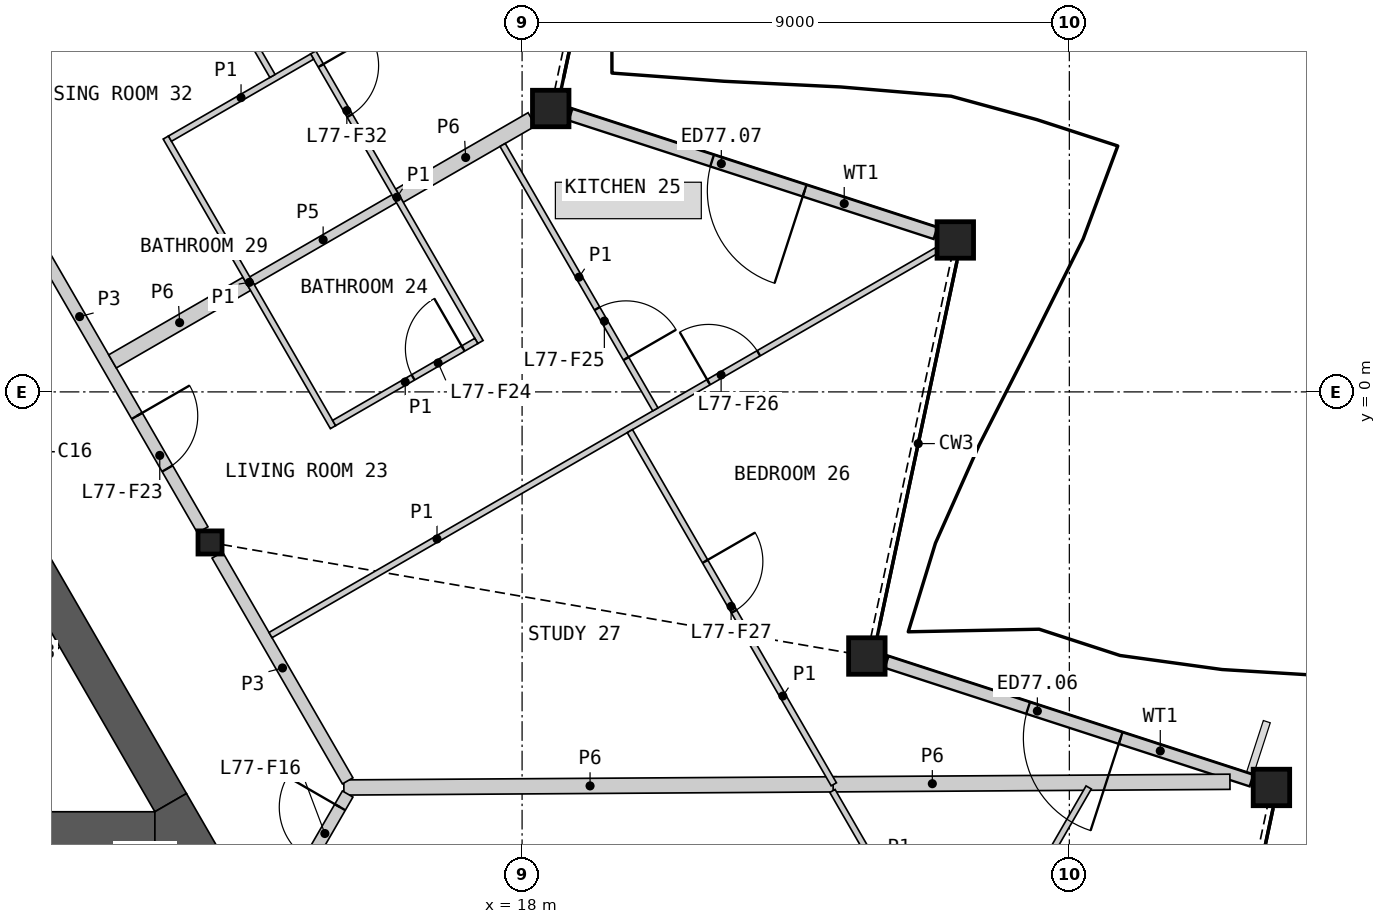
"""IFC4 building model, lengths in metres.
Left out: names, types, materials, properties, quantities, classifications, styles, units other than length and angle.
Written with IfcOpenShell. Run it as: python <this file> out.ifc"""

import sys

from ifc_helpers import new_model, si_unit, direction, frame, frame_2d, origin, origin_2d, place, context, subcontext, project, spatial, polyline, rectangle, hollow_rectangle, i_section, outline, extrude, element, fill, save


model = new_model("IFC4")
c1 = context("Model", 3, precision=1e-05, world=origin(), true_north=direction((0.0, 1.0)))
c2 = subcontext(c1, "Body", "Model", "MODEL_VIEW")
j1 = project(units=[si_unit("LENGTHUNIT", "METRE"), si_unit("PLANEANGLEUNIT", "RADIAN")], contexts=[c1])
p1 = place(None, origin())
s1 = spatial("IfcSite", under=j1, at=p1, CompositionType="ELEMENT")
p2 = place(p1, origin())
s2 = spatial("IfcBuilding", under=s1, at=p2, CompositionType="ELEMENT")
p3 = place(p2, frame((0.0, 0.0, 342.6)))
s3 = spatial("IfcBuildingStorey", under=s2, at=p3, CompositionType="ELEMENT", Elevation=342.6)
for number, where, z_axis, x_axis in (
    (1, (30.324, -6.506, 0.0), (0.0, 0.0, 1.0), (1.0, 0.0, 0.0)),
    (2, (23.67, -4.344, 0.0), (0.0, 0.0, 1.0), (1.0, 0.0, 0.0)),
    (3, (25.125, 2.499, 0.0), (0.0, 0.0, 1.0), (1.0, 0.0, 0.0)),
    (4, (18.471, 4.661, 0.0), (0.0, 0.0, 1.0), (1.0, 0.0, 0.0)),
):
    element("IfcColumn", number, at=place(p3, frame(where, z_axis=z_axis, x_axis=x_axis)), inside=s3, PredefinedType="COLUMN", context=c2, shape_type="SweptSolid", body=[
        extrude(hollow_rectangle(XDim=0.6, YDim=0.6, WallThickness=0.04, at=origin_2d()), origin(), (0.0, 0.0, 1.0), 3.4),
    ])
p4 = place(p3, frame((12.868, -2.476, 0.0), z_axis=(0.0, 0.0, 1.0), x_axis=(1.0, 0.0, 0.0)))
e5 = element("IfcColumn", 5, at=p4, inside=s3, PredefinedType="COLUMN", context=c2, shape_type="SweptSolid", body=[
    extrude(i_section(OverallWidth=0.396, OverallDepth=0.381, WebThickness=0.019, FlangeThickness=0.03, at=origin_2d()), origin(), (0.0, 0.0, 1.0), 3.4),
])
p5 = place(p3, frame((29.996, -6.393, 0.0), z_axis=(0.0, 0.0, 1.0), x_axis=(-0.951051127664, 0.309033578383, 0.0)))
e6 = element("IfcWall", 6, at=p5, inside=s3, PredefinedType="SOLIDWALL", context=c2, shape_type="SweptSolid", body=[
    extrude(rectangle(XDim=6.31, YDim=0.2, at=frame_2d((3.155, 0.0))), origin(), (0.0, 0.0, 1.0), 2.488),
])
p6 = place(p5, frame((2.263, 0.0, 0.0)))
e7 = element("IfcOpeningElement", 7, at=p6, cuts=e6, PredefinedType="OPENING", context=c2, shape_type="SweptSolid", body=[
    extrude(rectangle(XDim=1.6, YDim=2.25, at=frame_2d((0.8, 1.125))), frame((0.0, 0.11, 0.0), z_axis=(0.0, -1.0, 0.0), x_axis=(1.0, 0.0, 0.0)), (0.0, 0.0, 1.0), 0.22),
])
p7 = place(p3, frame((24.798, 2.609, 0.0), z_axis=(0.0, 0.0, 1.0), x_axis=(-0.951065616977, 0.308988983952, 0.0)))
e8 = element("IfcWall", 8, at=p7, inside=s3, PredefinedType="SOLIDWALL", context=c2, shape_type="SweptSolid", body=[
    extrude(rectangle(XDim=6.312, YDim=0.2, at=frame_2d((3.156, 0.0))), origin(), (0.0, 0.0, 1.0), 2.488),
])
p8 = place(p7, frame((2.263, 0.0, 0.0)))
e9 = element("IfcOpeningElement", 9, at=p8, cuts=e8, PredefinedType="OPENING", context=c2, shape_type="SweptSolid", body=[
    extrude(rectangle(XDim=1.6, YDim=2.25, at=frame_2d((0.8, 1.125))), frame((0.0, 0.11, 0.0), z_axis=(0.0, -1.0, 0.0), x_axis=(1.0, 0.0, 0.0)), (0.0, 0.0, 1.0), 0.22),
])
p9 = place(p3, origin())
e10 = element("IfcWall", 10, at=p9, inside=s3, PredefinedType="SHEAR", context=c2, shape_type="SweptSolid", body=[
    extrude(outline(polyline([(8.83, -6.881), (10.374, -4.206), (10.032, -4.298), (8.738, -6.539), (8.83, -6.881)])), origin(), (0.0, 0.0, 1.0), 3.1),
])
p10 = place(p3, origin())
e11 = element("IfcWall", 11, at=p10, inside=s3, PredefinedType="SHEAR", context=c2, shape_type="SweptSolid", body=[
    extrude(outline(polyline([(10.032, -4.298), (10.374, -4.206), (5.307, -1.281), (5.182, -1.498), (10.032, -4.298)])), origin(), (0.0, 0.0, 1.0), 3.1),
])
p11 = place(p3, frame((-11.961, -7.206, 0.0), z_axis=(0.0, 0.0, 1.0), x_axis=(1.0, 0.0, 0.0)))
e12 = element("IfcWall", 12, at=p11, inside=s3, PredefinedType="SHEAR", context=c2, shape_type="SweptSolid", body=[
    extrude(rectangle(XDim=23.921, YDim=0.6, at=frame_2d((11.961, 0.0))), origin(), (0.0, 0.0, 1.0), 3.1),
])
p12 = place(p3, frame((12.221, -6.756, 0.0), z_axis=(0.0, 0.0, 1.0), x_axis=(-0.50000604952, 0.866021911064, 0.0)))
e13 = element("IfcWall", 13, at=p12, inside=s3, PredefinedType="SHEAR", context=c2, shape_type="SweptSolid", body=[
    extrude(rectangle(XDim=4.869, YDim=0.6, at=frame_2d((2.434, 0.0))), origin(), (0.0, 0.0, 1.0), 3.1),
])
p13 = place(p3, origin())
e14 = element("IfcWall", 14, at=p13, inside=s3, PredefinedType="SHEAR", context=c2, shape_type="SweptSolid", body=[
    extrude(outline(polyline([(11.961, -7.506), (11.961, -6.906), (12.48, -6.606), (13.0, -7.506), (11.961, -7.506)])), origin(), (0.0, 0.0, 1.0), 3.1),
])
p14 = place(p3, frame((8.698, 4.745, 0.0), z_axis=(0.0, 0.0, 1.0), x_axis=(0.499984266882, -0.866034487114, 0.0)))
e15 = element("IfcWall", 15, at=p14, inside=s3, PredefinedType="PARTITIONING", context=c2, shape_type="SweptSolid", body=[
    extrude(rectangle(XDim=8.099, YDim=0.2, at=frame_2d((4.049, 0.0))), origin(), (0.0, 0.0, 1.0), 3.1),
])
p15 = place(p14, frame((5.935, 0.0, 0.0)))
e16 = element("IfcOpeningElement", 16, at=p15, cuts=e15, PredefinedType="OPENING", context=c2, shape_type="SweptSolid", body=[
    extrude(rectangle(XDim=1.0, YDim=2.1, at=frame_2d((0.5, 1.05))), frame((0.0, 0.11, 0.0), z_axis=(0.0, -1.0, 0.0), x_axis=(1.0, 0.0, 0.0)), (0.0, 0.0, 1.0), 0.22),
])
p16 = place(p3, frame((15.069, -6.506, 0.0), z_axis=(0.0, 0.0, 1.0), x_axis=(0.999979186485, 0.006451867641, 0.0)))
e17 = element("IfcWall", 17, at=p16, inside=s3, PredefinedType="PARTITIONING", context=c2, shape_type="SweptSolid", body=[
    extrude(rectangle(XDim=8.098, YDim=0.25, at=frame_2d((4.049, 0.0))), origin(), (0.0, 0.0, 1.0), 2.33),
])
p17 = place(p3, frame((23.115, -6.455, 0.0), z_axis=(0.0, 0.0, 1.0), x_axis=(0.999979299397, 0.006434343627, 0.0)))
e18 = element("IfcWall", 18, at=p17, inside=s3, PredefinedType="PARTITIONING", context=c2, shape_type="SweptSolid", body=[
    extrude(rectangle(XDim=6.526, YDim=0.25, at=frame_2d((3.263, 0.0))), origin(), (0.0, 0.0, 1.0), 2.33),
])
p18 = place(p3, frame((12.988, -2.684, 0.0), z_axis=(0.0, 0.0, 1.0), x_axis=(0.500003406062, -0.866023437285, 0.0)))
e19 = element("IfcWall", 19, at=p18, inside=s3, PredefinedType="PARTITIONING", context=c2, shape_type="SweptSolid", body=[
    extrude(rectangle(XDim=4.288, YDim=0.2, at=frame_2d((2.144, 0.0))), origin(), (0.0, 0.0, 1.0), 3.1),
])
p19 = place(p3, frame((13.293, -9.797, 0.0), z_axis=(0.0, 0.0, 1.0), x_axis=(0.499967746641, 0.866044024469, 0.0)))
e20 = element("IfcWall", 20, at=p19, inside=s3, PredefinedType="PARTITIONING", context=c2, shape_type="SweptSolid", body=[
    extrude(rectangle(XDim=3.676, YDim=0.2, at=frame_2d((1.838, 0.0))), origin(), (0.0, 0.0, 1.0), 3.1),
])
p20 = place(p19, frame((2.426, 0.0, 0.0)))
e21 = element("IfcOpeningElement", 21, at=p20, cuts=e20, PredefinedType="OPENING", context=c2, shape_type="SweptSolid", body=[
    extrude(rectangle(XDim=1.0, YDim=2.1, at=frame_2d((0.5, 1.05))), frame((0.0, 0.11, 0.0), z_axis=(0.0, -1.0, 0.0), x_axis=(1.0, 0.0, 0.0)), (0.0, 0.0, 1.0), 0.22),
])
p21 = place(p3, frame((11.264, 0.502, 0.0), z_axis=(0.0, 0.0, 1.0), x_axis=(0.866030925526, 0.499990435942, 0.0)))
e22 = element("IfcWall", 22, at=p21, inside=s3, PredefinedType="PARTITIONING", context=c2, shape_type="SweptSolid", body=[
    extrude(rectangle(XDim=2.55, YDim=0.25, at=frame_2d((1.275, 0.0))), origin(), (0.0, 0.0, 1.0), 2.33),
])
p22 = place(p3, frame((15.984, 3.227, 0.0), z_axis=(0.0, 0.0, 1.0), x_axis=(0.8660174017, 0.500013859761, 0.0)))
e23 = element("IfcWall", 23, at=p22, inside=s3, PredefinedType="PARTITIONING", context=c2, shape_type="SweptSolid", body=[
    extrude(rectangle(XDim=2.514, YDim=0.25, at=frame_2d((1.257, 0.0))), origin(), (0.0, 0.0, 1.0), 2.33),
])
p23 = place(p3, frame((13.559, 1.827, 0.0), z_axis=(0.0, 0.0, 1.0), x_axis=(0.866059108428, 0.4999416173, 0.0)))
e24 = element("IfcWall", 24, at=p23, inside=s3, PredefinedType="PLUMBINGWALL", context=c2, shape_type="SweptSolid", body=[
    extrude(rectangle(XDim=2.7, YDim=0.15, at=frame_2d((1.35, 0.0))), origin(), (0.0, 0.0, 1.0), 2.33),
])
p24 = place(p3, frame((13.863, -4.0, 0.0), z_axis=(0.0, 0.0, 1.0), x_axis=(0.866033203648, 0.499986489997, 0.0)))
e25 = element("IfcWall", 25, at=p24, inside=s3, PredefinedType="PARTITIONING", context=c2, shape_type="SweptSolid", body=[
    extrude(rectangle(XDim=12.646, YDim=0.1, at=frame_2d((6.323, 0.0))), origin(), (0.0, 0.0, 1.0), 2.33),
])
p25 = place(p24, frame((8.319, 0.0, 0.0)))
e26 = element("IfcOpeningElement", 26, at=p25, cuts=e25, PredefinedType="OPENING", context=c2, shape_type="SweptSolid", body=[
    extrude(rectangle(XDim=0.95, YDim=2.1, at=frame_2d((0.475, 1.05))), frame((0.0, 0.06, 0.0), z_axis=(0.0, -1.0, 0.0), x_axis=(1.0, 0.0, 0.0)), (0.0, 0.0, 1.0), 0.12),
])
p26 = place(p3, frame((8.786, 5.073, 0.0), z_axis=(0.0, 0.0, 1.0), x_axis=(0.86602139559, 0.500006942333, 0.0)))
e27 = element("IfcWall", 27, at=p26, inside=s3, PredefinedType="PARTITIONING", context=c2, shape_type="SweptSolid", body=[
    extrude(rectangle(XDim=12.505, YDim=0.1, at=frame_2d((6.252, 0.0))), origin(), (0.0, 0.0, 1.0), 2.33),
])
p27 = place(p26, frame((4.772, 0.0, 0.0)))
e28 = element("IfcOpeningElement", 28, at=p27, cuts=e27, PredefinedType="OPENING", context=c2, shape_type="SweptSolid", body=[
    extrude(rectangle(XDim=0.95, YDim=2.1, at=frame_2d((0.475, 1.05))), frame((0.0, 0.06, 0.0), z_axis=(0.0, -1.0, 0.0), x_axis=(1.0, 0.0, 0.0)), (0.0, 0.0, 1.0), 0.12),
])
p28 = place(p3, frame((23.331, -13.412, 0.0), z_axis=(0.0, 0.0, 1.0), x_axis=(0.499994510044, 0.866028573389, 0.0)))
e29 = element("IfcWall", 29, at=p28, inside=s3, PredefinedType="PARTITIONING", context=c2, shape_type="SweptSolid", body=[
    extrude(rectangle(XDim=7.975, YDim=0.1, at=frame_2d((3.988, 0.0))), origin(), (0.0, 0.0, 1.0), 2.33),
])
p29 = place(p28, frame((1.957, 0.0, 0.0)))
e30 = element("IfcOpeningElement", 30, at=p29, cuts=e29, PredefinedType="OPENING", context=c2, shape_type="SweptSolid", body=[
    extrude(rectangle(XDim=0.95, YDim=2.1, at=frame_2d((0.475, 1.05))), frame((0.0, 0.06, 0.0), z_axis=(0.0, -1.0, 0.0), x_axis=(1.0, 0.0, 0.0)), (0.0, 0.0, 1.0), 0.12),
])
p30 = place(p3, frame((19.773, -0.645, 0.0), z_axis=(0.0, 0.0, 1.0), x_axis=(0.499998644583, -0.866026186333, 0.0)))
e31 = element("IfcWall", 31, at=p30, inside=s3, PredefinedType="PARTITIONING", context=c2, shape_type="SweptSolid", body=[
    extrude(rectangle(XDim=6.708, YDim=0.1, at=frame_2d((3.354, 0.0))), origin(), (0.0, 0.0, 1.0), 2.33),
])
p31 = place(p30, frame((2.475, 0.0, 0.0)))
e32 = element("IfcOpeningElement", 32, at=p31, cuts=e31, PredefinedType="OPENING", context=c2, shape_type="SweptSolid", body=[
    extrude(rectangle(XDim=0.95, YDim=2.1, at=frame_2d((0.475, 1.05))), frame((0.0, 0.06, 0.0), z_axis=(0.0, -1.0, 0.0), x_axis=(1.0, 0.0, 0.0)), (0.0, 0.0, 1.0), 0.12),
])
p32 = place(p3, frame((14.565, 5.583, 0.0), z_axis=(0.0, 0.0, 1.0), x_axis=(0.499996545922, -0.866027397988, 0.0)))
e33 = element("IfcWall", 33, at=p32, inside=s3, PredefinedType="PARTITIONING", context=c2, shape_type="SweptSolid", body=[
    extrude(rectangle(XDim=5.5, YDim=0.1, at=frame_2d((2.75, 0.0))), origin(), (0.0, 0.0, 1.0), 2.33),
])
p33 = place(p32, frame((0.25, 0.0, 0.0)))
e34 = element("IfcOpeningElement", 34, at=p33, cuts=e33, PredefinedType="OPENING", context=c2, shape_type="SweptSolid", body=[
    extrude(rectangle(XDim=0.95, YDim=2.1, at=frame_2d((0.475, 1.05))), frame((0.0, 0.06, 0.0), z_axis=(0.0, -1.0, 0.0), x_axis=(1.0, 0.0, 0.0)), (0.0, 0.0, 1.0), 0.12),
])
p34 = place(p3, frame((12.14, 4.183, 0.0), z_axis=(0.0, 0.0, 1.0), x_axis=(0.499996545922, -0.866027397988, 0.0)))
e35 = element("IfcWall", 35, at=p34, inside=s3, PredefinedType="PARTITIONING", context=c2, shape_type="SweptSolid", body=[
    extrude(rectangle(XDim=5.5, YDim=0.1, at=frame_2d((2.75, 0.0))), origin(), (0.0, 0.0, 1.0), 2.33),
])
p35 = place(p3, frame((17.68, 4.062, 0.0), z_axis=(0.0, 0.0, 1.0), x_axis=(0.499997360652, -0.866026927608, 0.0)))
e36 = element("IfcWall", 36, at=p35, inside=s3, PredefinedType="PARTITIONING", context=c2, shape_type="SweptSolid", body=[
    extrude(rectangle(XDim=5.022, YDim=0.1, at=frame_2d((2.511, 0.0))), origin(), (0.0, 0.0, 1.0), 2.33),
])
p36 = place(p35, frame((3.108, 0.0, 0.0)))
e37 = element("IfcOpeningElement", 37, at=p36, cuts=e36, PredefinedType="OPENING", context=c2, shape_type="SweptSolid", body=[
    extrude(rectangle(XDim=0.95, YDim=2.1, at=frame_2d((0.475, 1.05))), frame((0.0, 0.06, 0.0), z_axis=(0.0, -1.0, 0.0), x_axis=(1.0, 0.0, 0.0)), (0.0, 0.0, 1.0), 0.12),
])
p37 = place(p3, frame((23.104, -6.563, 0.0), z_axis=(0.0, 0.0, 1.0), x_axis=(0.499999078476, -0.866025935826, 0.0)))
e38 = element("IfcWall", 38, at=p37, inside=s3, PredefinedType="PARTITIONING", context=c2, shape_type="SweptSolid", body=[
    extrude(rectangle(XDim=2.979, YDim=0.1, at=frame_2d((1.49, 0.0))), origin(), (0.0, 0.0, 1.0), 2.33),
])
p38 = place(p3, frame((14.909, -0.512, 0.0), z_axis=(0.0, 0.0, 1.0), x_axis=(0.866019956843, 0.50000943426, 0.0)))
e39 = element("IfcWall", 39, at=p38, inside=s3, PredefinedType="PARTITIONING", context=c2, shape_type="SweptSolid", body=[
    extrude(rectangle(XDim=2.7, YDim=0.1, at=frame_2d((1.35, 0.0))), origin(), (0.0, 0.0, 1.0), 2.33),
])
p39 = place(p38, frame((1.5, 0.0, 0.0)))
e40 = element("IfcOpeningElement", 40, at=p39, cuts=e39, PredefinedType="OPENING", context=c2, shape_type="SweptSolid", body=[
    extrude(rectangle(XDim=0.95, YDim=2.1, at=frame_2d((0.475, 1.05))), frame((0.0, 0.06, 0.0), z_axis=(0.0, -1.0, 0.0), x_axis=(1.0, 0.0, 0.0)), (0.0, 0.0, 1.0), 0.12),
])
p40 = place(p3, frame((12.209, 4.165, 0.0), z_axis=(0.0, 0.0, 1.0), x_axis=(0.866019956843, 0.50000943426, 0.0)))
e41 = element("IfcWall", 41, at=p40, inside=s3, PredefinedType="PARTITIONING", context=c2, shape_type="SweptSolid", body=[
    extrude(rectangle(XDim=2.7, YDim=0.1, at=frame_2d((1.35, 0.0))), origin(), (0.0, 0.0, 1.0), 2.33),
])
p41 = place(p3, frame((12.696, 7.272, 0.0), z_axis=(0.0, 0.0, 1.0), x_axis=(0.500016292001, -0.866015997389, 0.0)))
e42 = element("IfcWall", 42, at=p41, inside=s3, PredefinedType="PARTITIONING", context=c2, shape_type="SweptSolid", body=[
    extrude(rectangle(XDim=2.397, YDim=0.1, at=frame_2d((1.199, 0.0))), origin(), (0.0, 0.0, 1.0), 2.33),
])
p42 = place(p41, frame((0.882, 0.0, 0.0)))
e43 = element("IfcOpeningElement", 43, at=p42, cuts=e42, PredefinedType="OPENING", context=c2, shape_type="SweptSolid", body=[
    extrude(rectangle(XDim=0.95, YDim=2.1, at=frame_2d((0.475, 1.05))), frame((0.0, 0.06, 0.0), z_axis=(0.0, -1.0, 0.0), x_axis=(1.0, 0.0, 0.0)), (0.0, 0.0, 1.0), 0.12),
])
p43 = place(p6, origin())
e44 = element("IfcDoor", 44, at=p43, inside=s3, OperationType="DOUBLE_DOOR_SINGLE_SWING", PredefinedType="DOOR", context=c2, shape_type="SweptSolid", body=[
    extrude(rectangle(XDim=1.6, YDim=2.25, at=frame_2d((0.8, 1.125))), frame((0.0, 0.025, 0.0), z_axis=(0.0, -1.0, 0.0), x_axis=(1.0, 0.0, 0.0)), (0.0, 0.0, 1.0), 0.05),
])
fill(e7, e44)
p44 = place(p8, origin())
e45 = element("IfcDoor", 45, at=p44, inside=s3, OperationType="DOUBLE_DOOR_SINGLE_SWING", PredefinedType="DOOR", context=c2, shape_type="SweptSolid", body=[
    extrude(rectangle(XDim=1.6, YDim=2.25, at=frame_2d((0.8, 1.125))), frame((0.0, 0.025, 0.0), z_axis=(0.0, -1.0, 0.0), x_axis=(1.0, 0.0, 0.0)), (0.0, 0.0, 1.0), 0.05),
])
fill(e9, e45)
p45 = place(p20, origin())
e46 = element("IfcDoor", 46, at=p45, inside=s3, OperationType="SINGLE_SWING_RIGHT", PredefinedType="DOOR", context=c2, shape_type="SweptSolid", body=[
    extrude(rectangle(XDim=1.0, YDim=2.1, at=frame_2d((0.5, 1.05))), frame((0.0, 0.025, 0.0), z_axis=(0.0, -1.0, 0.0), x_axis=(1.0, 0.0, 0.0)), (0.0, 0.0, 1.0), 0.05),
])
fill(e21, e46)
p46 = place(p15, origin())
e47 = element("IfcDoor", 47, at=p46, inside=s3, OperationType="SINGLE_SWING_LEFT", PredefinedType="DOOR", context=c2, shape_type="SweptSolid", body=[
    extrude(rectangle(XDim=1.0, YDim=2.1, at=frame_2d((0.5, 1.05))), frame((0.0, 0.025, 0.0), z_axis=(0.0, -1.0, 0.0), x_axis=(1.0, 0.0, 0.0)), (0.0, 0.0, 1.0), 0.05),
])
fill(e16, e47)
p47 = place(p39, origin())
e48 = element("IfcDoor", 48, at=p47, inside=s3, OperationType="SINGLE_SWING_RIGHT", PredefinedType="DOOR", context=c2, shape_type="SweptSolid", body=[
    extrude(rectangle(XDim=0.95, YDim=2.1, at=frame_2d((0.475, 1.05))), frame((0.0, 0.025, 0.0), z_axis=(0.0, -1.0, 0.0), x_axis=(1.0, 0.0, 0.0)), (0.0, 0.0, 1.0), 0.05),
])
fill(e40, e48)
p48 = place(p36, origin())
e49 = element("IfcDoor", 49, at=p48, inside=s3, OperationType="SINGLE_SWING_RIGHT", PredefinedType="DOOR", context=c2, shape_type="SweptSolid", body=[
    extrude(rectangle(XDim=0.95, YDim=2.1, at=frame_2d((0.475, 1.05))), frame((0.0, 0.025, 0.0), z_axis=(0.0, -1.0, 0.0), x_axis=(1.0, 0.0, 0.0)), (0.0, 0.0, 1.0), 0.05),
])
fill(e37, e49)
p49 = place(p25, origin())
e50 = element("IfcDoor", 50, at=p49, inside=s3, OperationType="SINGLE_SWING_LEFT", PredefinedType="DOOR", context=c2, shape_type="SweptSolid", body=[
    extrude(rectangle(XDim=0.95, YDim=2.1, at=frame_2d((0.475, 1.05))), frame((0.0, 0.025, 0.0), z_axis=(0.0, -1.0, 0.0), x_axis=(1.0, 0.0, 0.0)), (0.0, 0.0, 1.0), 0.05),
])
fill(e26, e50)
p50 = place(p31, origin())
e51 = element("IfcDoor", 51, at=p50, inside=s3, OperationType="SINGLE_SWING_LEFT", PredefinedType="DOOR", context=c2, shape_type="SweptSolid", body=[
    extrude(rectangle(XDim=0.95, YDim=2.1, at=frame_2d((0.475, 1.05))), frame((0.0, 0.025, 0.0), z_axis=(0.0, -1.0, 0.0), x_axis=(1.0, 0.0, 0.0)), (0.0, 0.0, 1.0), 0.05),
])
fill(e32, e51)
p51 = place(p33, origin())
e52 = element("IfcDoor", 52, at=p51, inside=s3, OperationType="SINGLE_SWING_LEFT", PredefinedType="DOOR", context=c2, shape_type="SweptSolid", body=[
    extrude(rectangle(XDim=0.95, YDim=2.1, at=frame_2d((0.475, 1.05))), frame((0.0, 0.025, 0.0), z_axis=(0.0, -1.0, 0.0), x_axis=(1.0, 0.0, 0.0)), (0.0, 0.0, 1.0), 0.05),
])
fill(e34, e52)
save(model, sys.argv[1])
